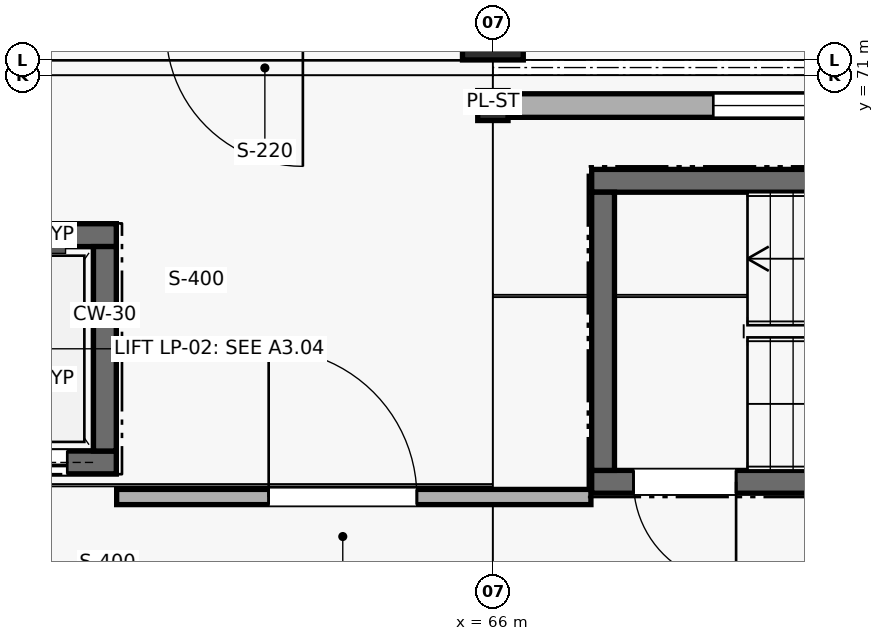
"""IFC4 building model, lengths in metres.
Left out: names, types, materials, properties, quantities, classifications, styles, units other than length and angle.
Written with IfcOpenShell. Run it as: python <this file> out.ifc"""

import sys

from ifc_helpers import new_model, si_unit, direction, frame, frame_2d, origin, origin_2d, place, context, subcontext, project, spatial, rectangle, i_section, extrude, element, fill, save


model = new_model("IFC4")
c1 = context("Model", 3, precision=1e-05, world=origin(), true_north=direction((0.0, 1.0)))
c2 = subcontext(c1, "Body", "Model", "MODEL_VIEW")
j1 = project(units=[si_unit("LENGTHUNIT", "METRE"), si_unit("PLANEANGLEUNIT", "RADIAN")], contexts=[c1])
p1 = place(None, origin())
s1 = spatial("IfcSite", under=j1, at=p1, CompositionType="ELEMENT")
p2 = place(p1, origin())
s2 = spatial("IfcBuilding", under=s1, at=p2, CompositionType="ELEMENT")
p3 = place(p2, origin())
s3 = spatial("IfcBuildingStorey", under=s2, at=p3, CompositionType="ELEMENT", Elevation=0.0)
p4 = place(p3, frame((66.0, 70.6, 0.0), z_axis=(0.0, 0.0, 1.0), x_axis=(1.0, 0.0, 0.0)))
e1 = element("IfcColumn", 1, at=p4, inside=s3, PredefinedType="COLUMN", context=c2, shape_type="SweptSolid", body=[
    extrude(i_section(OverallWidth=0.399, OverallDepth=0.394, WebThickness=0.023, FlangeThickness=0.037, FilletRadius=0.018, at=origin_2d()), origin(), (0.0, 0.0, 1.0), 5.4),
])
p5 = place(p3, frame((66.0, 71.6, 0.0), z_axis=(0.0, 0.0, 1.0), x_axis=(1.0, 0.0, 0.0)))
e2 = element("IfcColumn", 2, at=p5, inside=s3, PredefinedType="COLUMN", context=c2, shape_type="SweptSolid", body=[
    extrude(rectangle(XDim=0.8, YDim=0.8, at=origin_2d()), origin(), (0.0, 0.0, 1.0), 5.4),
])
p6 = place(p3, frame((76.991, 70.6, 0.0), z_axis=(0.0, 0.0, 1.0), x_axis=(-1.0, 0.0, 0.0)))
e3 = element("IfcWall", 3, at=p6, inside=s3, PredefinedType="SOLIDWALL", context=c2, shape_type="SweptSolid", body=[
    extrude(rectangle(XDim=10.981, YDim=0.31, at=frame_2d((5.491, 0.0))), origin(), (0.0, 0.0, 1.0), 4.315),
])
p7 = place(p6, frame((2.591, 0.0, 1.05)))
e4 = element("IfcOpeningElement", 4, at=p7, cuts=e3, PredefinedType="OPENING", context=c2, shape_type="SweptSolid", body=[
    extrude(rectangle(XDim=1.8, YDim=1.8, at=frame_2d((0.9, 0.9))), frame((0.0, 0.165, 0.0), z_axis=(0.0, -1.0, 0.0), x_axis=(1.0, 0.0, 0.0)), (0.0, 0.0, 1.0), 0.33),
])
p8 = place(p6, frame((6.291, 0.0, 1.05)))
e5 = element("IfcOpeningElement", 5, at=p8, cuts=e3, PredefinedType="OPENING", context=c2, shape_type="SweptSolid", body=[
    extrude(rectangle(XDim=1.8, YDim=1.8, at=frame_2d((0.9, 0.9))), frame((0.0, 0.165, 0.0), z_axis=(0.0, -1.0, 0.0), x_axis=(1.0, 0.0, 0.0)), (0.0, 0.0, 1.0), 0.33),
])
p9 = place(p3, frame((67.3, 65.65, 0.0), z_axis=(0.0, 0.0, 1.0), x_axis=(1.0, 0.0, 0.0)))
e6 = element("IfcWall", 6, at=p9, inside=s3, PredefinedType="SHEAR", context=c2, shape_type="SweptSolid", body=[
    extrude(rectangle(XDim=8.65, YDim=0.3, at=frame_2d((4.325, 0.0))), origin(), (0.0, 0.0, 1.0), 5.1),
])
p10 = place(p9, frame((0.55, 0.0, 0.0)))
e7 = element("IfcOpeningElement", 7, at=p10, cuts=e6, PredefinedType="OPENING", context=c2, shape_type="SweptSolid", body=[
    extrude(rectangle(XDim=1.35, YDim=2.2, at=frame_2d((0.675, 1.1))), frame((0.0, 0.16, 0.0), z_axis=(0.0, -1.0, 0.0), x_axis=(1.0, 0.0, 0.0)), (0.0, 0.0, 1.0), 0.32),
])
p11 = place(p3, frame((75.95, 69.61, 0.0), z_axis=(0.0, 0.0, 1.0), x_axis=(-1.0, 0.0, 0.0)))
e8 = element("IfcWall", 8, at=p11, inside=s3, PredefinedType="SHEAR", context=c2, shape_type="SweptSolid", body=[
    extrude(rectangle(XDim=8.65, YDim=0.3, at=frame_2d((4.325, 0.0))), origin(), (0.0, 0.0, 1.0), 5.1),
])
p12 = place(p3, frame((67.45, 69.46, 0.0), z_axis=(0.0, 0.0, 1.0), x_axis=(0.0, -1.0, 0.0)))
e9 = element("IfcWall", 9, at=p12, inside=s3, PredefinedType="SHEAR", context=c2, shape_type="SweptSolid", body=[
    extrude(rectangle(XDim=3.66, YDim=0.3, at=frame_2d((1.83, 0.0))), origin(), (0.0, 0.0, 1.0), 5.1),
])
for number, where, z_axis, x_axis in (
    (10, (58.555, 65.905, -1.4), (0.0, 0.0, 1.0), (1.0, 0.0, 0.0)),
    (11, (61.045, 68.895, -1.4), (0.0, 0.0, 1.0), (-1.0, 0.0, 0.0)),
):
    element("IfcWall", number, at=place(p3, frame(where, z_axis=z_axis, x_axis=x_axis)), inside=s3, PredefinedType="SHEAR", context=c2, shape_type="SweptSolid", body=[
        extrude(rectangle(XDim=2.49, YDim=0.3, at=frame_2d((1.245, 0.0))), origin(), (0.0, 0.0, 1.0), 1.0),
    ])
p13 = place(p3, frame((60.895, 66.055, -1.4), z_axis=(0.0, 0.0, 1.0), x_axis=(0.0, 1.0, 0.0)))
e12 = element("IfcWall", 12, at=p13, inside=s3, PredefinedType="SHEAR", context=c2, shape_type="SweptSolid", body=[
    extrude(rectangle(XDim=2.69, YDim=0.3, at=frame_2d((1.345, 0.0))), origin(), (0.0, 0.0, 1.0), 1.0),
])
p14 = place(p3, frame((58.555, 65.905, 0.0), z_axis=(0.0, 0.0, 1.0), x_axis=(1.0, 0.0, 0.0)))
e13 = element("IfcWall", 13, at=p14, inside=s3, PredefinedType="SHEAR", context=c2, shape_type="SweptSolid", body=[
    extrude(rectangle(XDim=2.49, YDim=0.3, at=frame_2d((1.245, 0.0))), origin(), (0.0, 0.0, 1.0), 5.1),
])
p15 = place(p14, frame((0.645, 0.0, 0.0)))
e14 = element("IfcOpeningElement", 14, at=p15, cuts=e13, PredefinedType="OPENING", context=c2, shape_type="SweptSolid", body=[
    extrude(rectangle(XDim=1.2, YDim=2.15, at=frame_2d((0.6, 1.075))), frame((0.0, 0.16, 0.0), z_axis=(0.0, -1.0, 0.0), x_axis=(1.0, 0.0, 0.0)), (0.0, 0.0, 1.0), 0.32),
])
p16 = place(p3, frame((61.045, 68.895, 0.0), z_axis=(0.0, 0.0, 1.0), x_axis=(-1.0, 0.0, 0.0)))
e15 = element("IfcWall", 15, at=p16, inside=s3, PredefinedType="SHEAR", context=c2, shape_type="SweptSolid", body=[
    extrude(rectangle(XDim=2.49, YDim=0.3, at=frame_2d((1.245, 0.0))), origin(), (0.0, 0.0, 1.0), 5.1),
])
p17 = place(p3, frame((60.895, 66.055, 0.0), z_axis=(0.0, 0.0, 1.0), x_axis=(0.0, 1.0, 0.0)))
e16 = element("IfcWall", 16, at=p17, inside=s3, PredefinedType="SHEAR", context=c2, shape_type="SweptSolid", body=[
    extrude(rectangle(XDim=2.69, YDim=0.3, at=frame_2d((1.345, 0.0))), origin(), (0.0, 0.0, 1.0), 5.1),
])
p18 = place(p3, frame((61.05, 65.45, 0.0), z_axis=(0.0, 0.0, 1.0), x_axis=(1.0, 0.0, 0.0)))
e17 = element("IfcWall", 17, at=p18, inside=s3, PredefinedType="PARTITIONING", context=c2, shape_type="SweptSolid", body=[
    extrude(rectangle(XDim=6.24, YDim=0.2, at=frame_2d((3.12, 0.0))), origin(), (0.0, 0.0, 1.0), 4.483),
])
p19 = place(p18, frame((2.0, 0.0, 0.0)))
e18 = element("IfcOpeningElement", 18, at=p19, cuts=e17, PredefinedType="OPENING", context=c2, shape_type="SweptSolid", body=[
    extrude(rectangle(XDim=1.95, YDim=2.45, at=frame_2d((0.975, 1.225))), frame((0.0, 0.11, 0.0), z_axis=(0.0, -1.0, 0.0), x_axis=(1.0, 0.0, 0.0)), (0.0, 0.0, 1.0), 0.22),
])
p20 = place(p8, origin())
e19 = element("IfcWindow", 19, at=p20, inside=s3, PartitioningType="SINGLE_PANEL", PredefinedType="WINDOW", context=c2, shape_type="SweptSolid", body=[
    extrude(rectangle(XDim=1.8, YDim=1.8, at=frame_2d((0.9, 0.9))), frame((0.0, 0.03, 0.0), z_axis=(0.0, -1.0, 0.0), x_axis=(1.0, 0.0, 0.0)), (0.0, 0.0, 1.0), 0.06),
])
fill(e5, e19)
p21 = place(p10, frame((1.35, 0.0, 0.0), z_axis=(0.0, 0.0, 1.0), x_axis=(-1.0, 0.0, 0.0)))
e20 = element("IfcDoor", 20, at=p21, inside=s3, OperationType="SINGLE_SWING_LEFT", PredefinedType="DOOR", context=c2, shape_type="SweptSolid", body=[
    extrude(rectangle(XDim=1.35, YDim=2.2, at=frame_2d((0.675, 1.1))), frame((0.0, 0.025, 0.0), z_axis=(0.0, -1.0, 0.0), x_axis=(1.0, 0.0, 0.0)), (0.0, 0.0, 1.0), 0.05),
])
fill(e7, e20)
p22 = place(p15, frame((1.2, 0.0, 0.0), z_axis=(0.0, 0.0, 1.0), x_axis=(-1.0, 0.0, 0.0)))
e21 = element("IfcDoor", 21, at=p22, inside=s3, OperationType="DOUBLE_DOOR_SLIDING", PredefinedType="DOOR", context=c2, shape_type="SweptSolid", body=[
    extrude(rectangle(XDim=1.2, YDim=2.15, at=frame_2d((0.6, 1.075))), frame((0.0, 0.025, 0.0), z_axis=(0.0, -1.0, 0.0), x_axis=(1.0, 0.0, 0.0)), (0.0, 0.0, 1.0), 0.05),
])
fill(e14, e21)
p23 = place(p19, origin())
e22 = element("IfcDoor", 22, at=p23, inside=s3, OperationType="SINGLE_SWING_LEFT", PredefinedType="DOOR", context=c2, shape_type="SweptSolid", body=[
    extrude(rectangle(XDim=1.95, YDim=2.45, at=frame_2d((0.975, 1.225))), frame((0.0, 0.025, 0.0), z_axis=(0.0, -1.0, 0.0), x_axis=(1.0, 0.0, 0.0)), (0.0, 0.0, 1.0), 0.05),
])
fill(e18, e22)
save(model, sys.argv[1])
